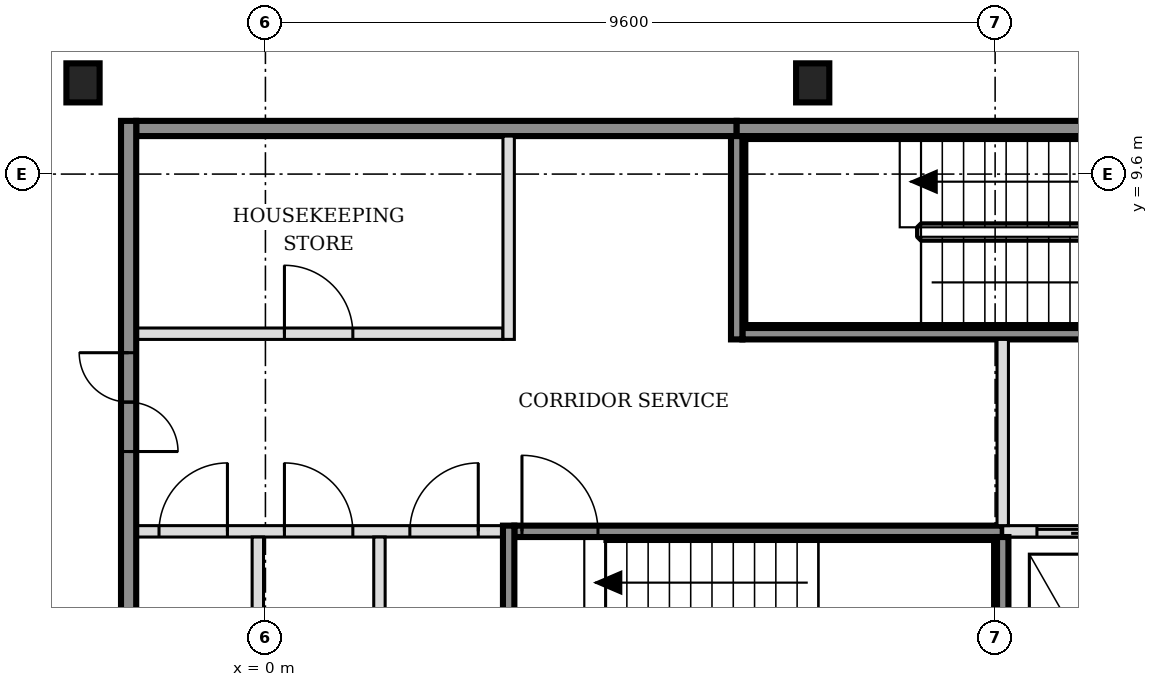
"""IFC4 building model, lengths in metres.
Left out: names, types, materials, properties, quantities, classifications, styles, units other than length and angle.
Written with IfcOpenShell. Run it as: python <this file> out.ifc"""

import sys

from ifc_helpers import new_model, si_unit, direction, frame, frame_2d, origin, origin_2d, place, context, subcontext, project, spatial, rectangle, i_section, extrude, element, fill, save


model = new_model("IFC4")
c1 = context("Model", 3, precision=1e-05, world=origin(), true_north=direction((0.0, 1.0)))
c2 = subcontext(c1, "Body", "Model", "MODEL_VIEW")
j1 = project(units=[si_unit("LENGTHUNIT", "METRE"), si_unit("PLANEANGLEUNIT", "RADIAN")], contexts=[c1])
p1 = place(None, origin())
s1 = spatial("IfcSite", under=j1, at=p1, CompositionType="ELEMENT")
p2 = place(p1, origin())
s2 = spatial("IfcBuilding", under=s1, at=p2, CompositionType="ELEMENT")
p3 = place(p2, frame((0.0, 0.0, 76.2)))
s3 = spatial("IfcBuildingStorey", under=s2, at=p3, CompositionType="ELEMENT", Elevation=76.2)
for number, where, z_axis, x_axis in (
    (1, (-2.4, 10.8, -0.15), (0.0, 0.0, 1.0), (1.0, 0.0, 0.0)),
    (2, (7.2, 10.8, -0.15), (0.0, 0.0, 1.0), (1.0, 0.0, 0.0)),
):
    element("IfcColumn", number, at=place(p3, frame(where, z_axis=z_axis, x_axis=x_axis)), inside=s3, PredefinedType="COLUMN", context=c2, shape_type="SweptSolid", body=[
        extrude(i_section(OverallWidth=0.437, OverallDepth=0.514, WebThickness=0.061, FlangeThickness=0.097, FilletRadius=0.015, at=origin_2d()), origin(), (0.0, 0.0, 1.0), 3.6),
    ])
p4 = place(p3, frame((-1.7, 4.9, 0.0), z_axis=(0.0, 0.0, 1.0), x_axis=(1.0, 0.0, 0.0)))
e3 = element("IfcWall", 3, at=p4, inside=s3, PredefinedType="PARTITIONING", context=c2, shape_type="SweptSolid", body=[
    extrude(rectangle(XDim=4.825, YDim=0.15, at=frame_2d((2.413, 0.0))), origin(), (0.0, 0.0, 1.0), 3.45),
])
p5 = place(p4, frame((0.3, 0.0, 0.0)))
e4 = element("IfcOpeningElement", 4, at=p5, cuts=e3, PredefinedType="OPENING", context=c2, shape_type="SweptSolid", body=[
    extrude(rectangle(XDim=0.9, YDim=2.1, at=frame_2d((0.45, 1.05))), frame((0.0, 0.085, 0.0), z_axis=(0.0, -1.0, 0.0), x_axis=(1.0, 0.0, 0.0)), (0.0, 0.0, 1.0), 0.17),
])
p6 = place(p4, frame((1.95, 0.0, 0.0)))
e5 = element("IfcOpeningElement", 5, at=p6, cuts=e3, PredefinedType="OPENING", context=c2, shape_type="SweptSolid", body=[
    extrude(rectangle(XDim=0.9, YDim=2.1, at=frame_2d((0.45, 1.05))), frame((0.0, 0.085, 0.0), z_axis=(0.0, -1.0, 0.0), x_axis=(1.0, 0.0, 0.0)), (0.0, 0.0, 1.0), 0.17),
])
p7 = place(p4, frame((3.6, 0.0, 0.0)))
e6 = element("IfcOpeningElement", 6, at=p7, cuts=e3, PredefinedType="OPENING", context=c2, shape_type="SweptSolid", body=[
    extrude(rectangle(XDim=0.9, YDim=2.1, at=frame_2d((0.45, 1.05))), frame((0.0, 0.085, 0.0), z_axis=(0.0, -1.0, 0.0), x_axis=(1.0, 0.0, 0.0)), (0.0, 0.0, 1.0), 0.17),
])
p8 = place(p3, frame((3.275, 4.9, 0.0), z_axis=(0.0, 0.0, 1.0), x_axis=(1.0, 0.0, 0.0)))
e7 = element("IfcWall", 7, at=p8, inside=s3, PredefinedType="SOLIDWALL", context=c2, shape_type="SweptSolid", body=[
    extrude(rectangle(XDim=6.425, YDim=0.15, at=frame_2d((3.212, 0.0))), origin(), (0.0, 0.0, 1.0), 3.45),
])
p9 = place(p8, frame((0.1, 0.0, 0.0)))
e8 = element("IfcOpeningElement", 8, at=p9, cuts=e7, PredefinedType="OPENING", context=c2, shape_type="SweptSolid", body=[
    extrude(rectangle(XDim=1.0, YDim=2.1, at=frame_2d((0.5, 1.05))), frame((0.0, 0.085, 0.0), z_axis=(0.0, -1.0, 0.0), x_axis=(1.0, 0.0, 0.0)), (0.0, 0.0, 1.0), 0.17),
])
p10 = place(p3, frame((9.7, 4.9, 0.0), z_axis=(0.0, 0.0, 1.0), x_axis=(1.0, 0.0, 0.0)))
e9 = element("IfcWall", 9, at=p10, inside=s3, PredefinedType="SOLIDWALL", context=c2, shape_type="SweptSolid", body=[
    extrude(rectangle(XDim=6.4, YDim=0.15, at=frame_2d((3.2, 0.0))), origin(), (0.0, 0.0, 1.0), 3.45),
])
p11 = place(p10, frame((0.45, 0.0, 0.0)))
e10 = element("IfcOpeningElement", 10, at=p11, cuts=e9, PredefinedType="OPENING", context=c2, shape_type="SweptSolid", body=[
    extrude(rectangle(XDim=1.0, YDim=2.1, at=frame_2d((0.5, 1.05))), frame((0.0, 0.085, 0.0), z_axis=(0.0, -1.0, 0.0), x_axis=(1.0, 0.0, 0.0)), (0.0, 0.0, 1.0), 0.17),
])
p12 = place(p10, frame((2.35, 0.0, 0.0)))
e11 = element("IfcOpeningElement", 11, at=p12, cuts=e9, PredefinedType="OPENING", context=c2, shape_type="SweptSolid", body=[
    extrude(rectangle(XDim=1.0, YDim=2.1, at=frame_2d((0.5, 1.05))), frame((0.0, 0.085, 0.0), z_axis=(0.0, -1.0, 0.0), x_axis=(1.0, 0.0, 0.0)), (0.0, 0.0, 1.0), 0.17),
])
p13 = place(p10, frame((4.7, 0.0, 0.0)))
e12 = element("IfcOpeningElement", 12, at=p13, cuts=e9, PredefinedType="OPENING", context=c2, shape_type="SweptSolid", body=[
    extrude(rectangle(XDim=0.9, YDim=2.1, at=frame_2d((0.45, 1.05))), frame((0.0, 0.085, 0.0), z_axis=(0.0, -1.0, 0.0), x_axis=(1.0, 0.0, 0.0)), (0.0, 0.0, 1.0), 0.17),
])
p14 = place(p3, frame((-1.7, 7.5, 0.0), z_axis=(0.0, 0.0, 1.0), x_axis=(1.0, 0.0, 0.0)))
e13 = element("IfcWall", 13, at=p14, inside=s3, PredefinedType="PARTITIONING", context=c2, shape_type="SweptSolid", body=[
    extrude(rectangle(XDim=4.825, YDim=0.15, at=frame_2d((2.413, 0.0))), origin(), (0.0, 0.0, 1.0), 3.45),
])
p15 = place(p14, frame((1.95, 0.0, 0.0)))
e14 = element("IfcOpeningElement", 14, at=p15, cuts=e13, PredefinedType="OPENING", context=c2, shape_type="SweptSolid", body=[
    extrude(rectangle(XDim=0.9, YDim=2.1, at=frame_2d((0.45, 1.05))), frame((0.0, 0.085, 0.0), z_axis=(0.0, -1.0, 0.0), x_axis=(1.0, 0.0, 0.0)), (0.0, 0.0, 1.0), 0.17),
])
p16 = place(p3, frame((6.275, 7.5, 0.0), z_axis=(0.0, 0.0, 1.0), x_axis=(1.0, 0.0, 0.0)))
e15 = element("IfcWall", 15, at=p16, inside=s3, PredefinedType="SOLIDWALL", context=c2, shape_type="SweptSolid", body=[
    extrude(rectangle(XDim=6.425, YDim=0.15, at=frame_2d((3.212, 0.0))), origin(), (0.0, 0.0, 1.0), 3.45),
])
p17 = place(p16, frame((5.225, 0.0, 0.0)))
e16 = element("IfcOpeningElement", 16, at=p17, cuts=e15, PredefinedType="OPENING", context=c2, shape_type="SweptSolid", body=[
    extrude(rectangle(XDim=1.0, YDim=2.1, at=frame_2d((0.5, 1.05))), frame((0.0, 0.085, 0.0), z_axis=(0.0, -1.0, 0.0), x_axis=(1.0, 0.0, 0.0)), (0.0, 0.0, 1.0), 0.17),
])
p18 = place(p3, frame((-1.7, 10.2, 0.0), z_axis=(0.0, 0.0, 1.0), x_axis=(1.0, 0.0, 0.0)))
e17 = element("IfcWall", 17, at=p18, inside=s3, PredefinedType="SOLIDWALL", context=c2, shape_type="SweptSolid", body=[
    extrude(rectangle(XDim=7.9, YDim=0.2, at=frame_2d((3.95, 0.0))), origin(), (0.0, 0.0, 1.0), 3.45),
])
p19 = place(p3, frame((6.2, 10.2, 0.0), z_axis=(0.0, 0.0, 1.0), x_axis=(1.0, 0.0, 0.0)))
e18 = element("IfcWall", 18, at=p19, inside=s3, PredefinedType="SOLIDWALL", context=c2, shape_type="SweptSolid", body=[
    extrude(rectangle(XDim=6.5, YDim=0.2, at=frame_2d((3.25, 0.0))), origin(), (0.0, 0.0, 1.0), 3.45),
])
p20 = place(p3, frame((-1.8, -5.5, 0.0), z_axis=(0.0, 0.0, 1.0), x_axis=(0.0, 1.0, 0.0)))
e19 = element("IfcWall", 19, at=p20, inside=s3, PredefinedType="SOLIDWALL", context=c2, shape_type="SweptSolid", body=[
    extrude(rectangle(XDim=15.8, YDim=0.2, at=frame_2d((7.9, 0.0))), origin(), (0.0, 0.0, 1.0), 3.45),
])
p21 = place(p20, frame((3.05, 0.0, 0.0)))
e20 = element("IfcOpeningElement", 20, at=p21, cuts=e19, PredefinedType="OPENING", context=c2, shape_type="SweptSolid", body=[
    extrude(rectangle(XDim=1.3, YDim=2.1, at=frame_2d((0.65, 1.05))), frame((0.0, 0.11, 0.0), z_axis=(0.0, -1.0, 0.0), x_axis=(1.0, 0.0, 0.0)), (0.0, 0.0, 1.0), 0.22),
])
p22 = place(p20, frame((11.45, 0.0, 0.0)))
e21 = element("IfcOpeningElement", 21, at=p22, cuts=e19, PredefinedType="OPENING", context=c2, shape_type="SweptSolid", body=[
    extrude(rectangle(XDim=1.3, YDim=2.1, at=frame_2d((0.65, 1.05))), frame((0.0, 0.11, 0.0), z_axis=(0.0, -1.0, 0.0), x_axis=(1.0, 0.0, 0.0)), (0.0, 0.0, 1.0), 0.22),
])
for number, where, z_axis, x_axis in (
    (22, (-0.1, 2.275, 0.0), (0.0, 0.0, 1.0), (0.0, 1.0, 0.0)),
    (23, (1.5, 2.275, 0.0), (0.0, 0.0, 1.0), (0.0, 1.0, 0.0)),
):
    element("IfcWall", number, at=place(p3, frame(where, z_axis=z_axis, x_axis=x_axis)), inside=s3, PredefinedType="PARTITIONING", context=c2, shape_type="SweptSolid", body=[
        extrude(rectangle(XDim=2.55, YDim=0.15, at=frame_2d((1.275, 0.0))), origin(), (0.0, 0.0, 1.0), 3.45),
    ])
p23 = place(p3, frame((3.2, 2.275, 0.0), z_axis=(0.0, 0.0, 1.0), x_axis=(0.0, 1.0, 0.0)))
e24 = element("IfcWall", 24, at=p23, inside=s3, PredefinedType="SOLIDWALL", context=c2, shape_type="SweptSolid", body=[
    extrude(rectangle(XDim=2.7, YDim=0.15, at=frame_2d((1.35, 0.0))), origin(), (0.0, 0.0, 1.0), 3.45),
])
p24 = place(p3, frame((3.2, 7.425, 0.0), z_axis=(0.0, 0.0, 1.0), x_axis=(0.0, 1.0, 0.0)))
e25 = element("IfcWall", 25, at=p24, inside=s3, PredefinedType="PARTITIONING", context=c2, shape_type="SweptSolid", body=[
    extrude(rectangle(XDim=2.675, YDim=0.15, at=frame_2d((1.337, 0.0))), origin(), (0.0, 0.0, 1.0), 3.45),
])
p25 = place(p3, frame((6.2, 7.425, 0.0), z_axis=(0.0, 0.0, 1.0), x_axis=(0.0, 1.0, 0.0)))
e26 = element("IfcWall", 26, at=p25, inside=s3, PredefinedType="SOLIDWALL", context=c2, shape_type="SweptSolid", body=[
    extrude(rectangle(XDim=2.675, YDim=0.15, at=frame_2d((1.337, 0.0))), origin(), (0.0, 0.0, 1.0), 3.45),
])
p26 = place(p3, frame((9.7, 2.275, 0.0), z_axis=(0.0, 0.0, 1.0), x_axis=(0.0, 1.0, 0.0)))
e27 = element("IfcWall", 27, at=p26, inside=s3, PredefinedType="SOLIDWALL", context=c2, shape_type="SweptSolid", body=[
    extrude(rectangle(XDim=2.55, YDim=0.15, at=frame_2d((1.275, 0.0))), origin(), (0.0, 0.0, 1.0), 3.45),
])
p27 = place(p3, frame((9.7, 4.975, 0.0), z_axis=(0.0, 0.0, 1.0), x_axis=(0.0, 1.0, 0.0)))
e28 = element("IfcWall", 28, at=p27, inside=s3, PredefinedType="SOLIDWALL", context=c2, shape_type="SweptSolid", body=[
    extrude(rectangle(XDim=2.45, YDim=0.15, at=frame_2d((1.225, 0.0))), origin(), (0.0, 0.0, 1.0), 3.45),
])
p28 = place(p11, origin())
e29 = element("IfcDoor", 29, at=p28, inside=s3, OperationType="DOUBLE_DOOR_SLIDING", PredefinedType="DOOR", context=c2, shape_type="SweptSolid", body=[
    extrude(rectangle(XDim=1.0, YDim=2.1, at=frame_2d((0.5, 1.05))), frame((0.0, 0.025, 0.0), z_axis=(0.0, -1.0, 0.0), x_axis=(1.0, 0.0, 0.0)), (0.0, 0.0, 1.0), 0.05),
])
fill(e10, e29)
p29 = place(p9, origin())
e30 = element("IfcDoor", 30, at=p29, inside=s3, OperationType="SINGLE_SWING_LEFT", PredefinedType="DOOR", context=c2, shape_type="SweptSolid", body=[
    extrude(rectangle(XDim=1.0, YDim=2.1, at=frame_2d((0.5, 1.05))), frame((0.0, 0.025, 0.0), z_axis=(0.0, -1.0, 0.0), x_axis=(1.0, 0.0, 0.0)), (0.0, 0.0, 1.0), 0.05),
])
fill(e8, e30)
p30 = place(p22, origin())
e31 = element("IfcDoor", 31, at=p30, inside=s3, OperationType="DOUBLE_DOOR_SINGLE_SWING", PredefinedType="DOOR", context=c2, shape_type="SweptSolid", body=[
    extrude(rectangle(XDim=1.3, YDim=2.1, at=frame_2d((0.65, 1.05))), frame((0.0, 0.025, 0.0), z_axis=(0.0, -1.0, 0.0), x_axis=(1.0, 0.0, 0.0)), (0.0, 0.0, 1.0), 0.05),
])
fill(e21, e31)
p31 = place(p5, origin())
e32 = element("IfcDoor", 32, at=p31, inside=s3, OperationType="SINGLE_SWING_RIGHT", PredefinedType="DOOR", context=c2, shape_type="SweptSolid", body=[
    extrude(rectangle(XDim=0.9, YDim=2.1, at=frame_2d((0.45, 1.05))), frame((0.0, 0.025, 0.0), z_axis=(0.0, -1.0, 0.0), x_axis=(1.0, 0.0, 0.0)), (0.0, 0.0, 1.0), 0.05),
])
fill(e4, e32)
p32 = place(p6, origin())
e33 = element("IfcDoor", 33, at=p32, inside=s3, OperationType="SINGLE_SWING_LEFT", PredefinedType="DOOR", context=c2, shape_type="SweptSolid", body=[
    extrude(rectangle(XDim=0.9, YDim=2.1, at=frame_2d((0.45, 1.05))), frame((0.0, 0.025, 0.0), z_axis=(0.0, -1.0, 0.0), x_axis=(1.0, 0.0, 0.0)), (0.0, 0.0, 1.0), 0.05),
])
fill(e5, e33)
p33 = place(p7, origin())
e34 = element("IfcDoor", 34, at=p33, inside=s3, OperationType="SINGLE_SWING_RIGHT", PredefinedType="DOOR", context=c2, shape_type="SweptSolid", body=[
    extrude(rectangle(XDim=0.9, YDim=2.1, at=frame_2d((0.45, 1.05))), frame((0.0, 0.025, 0.0), z_axis=(0.0, -1.0, 0.0), x_axis=(1.0, 0.0, 0.0)), (0.0, 0.0, 1.0), 0.05),
])
fill(e6, e34)
p34 = place(p15, origin())
e35 = element("IfcDoor", 35, at=p34, inside=s3, OperationType="SINGLE_SWING_LEFT", PredefinedType="DOOR", context=c2, shape_type="SweptSolid", body=[
    extrude(rectangle(XDim=0.9, YDim=2.1, at=frame_2d((0.45, 1.05))), frame((0.0, 0.025, 0.0), z_axis=(0.0, -1.0, 0.0), x_axis=(1.0, 0.0, 0.0)), (0.0, 0.0, 1.0), 0.05),
])
fill(e14, e35)
save(model, sys.argv[1])
